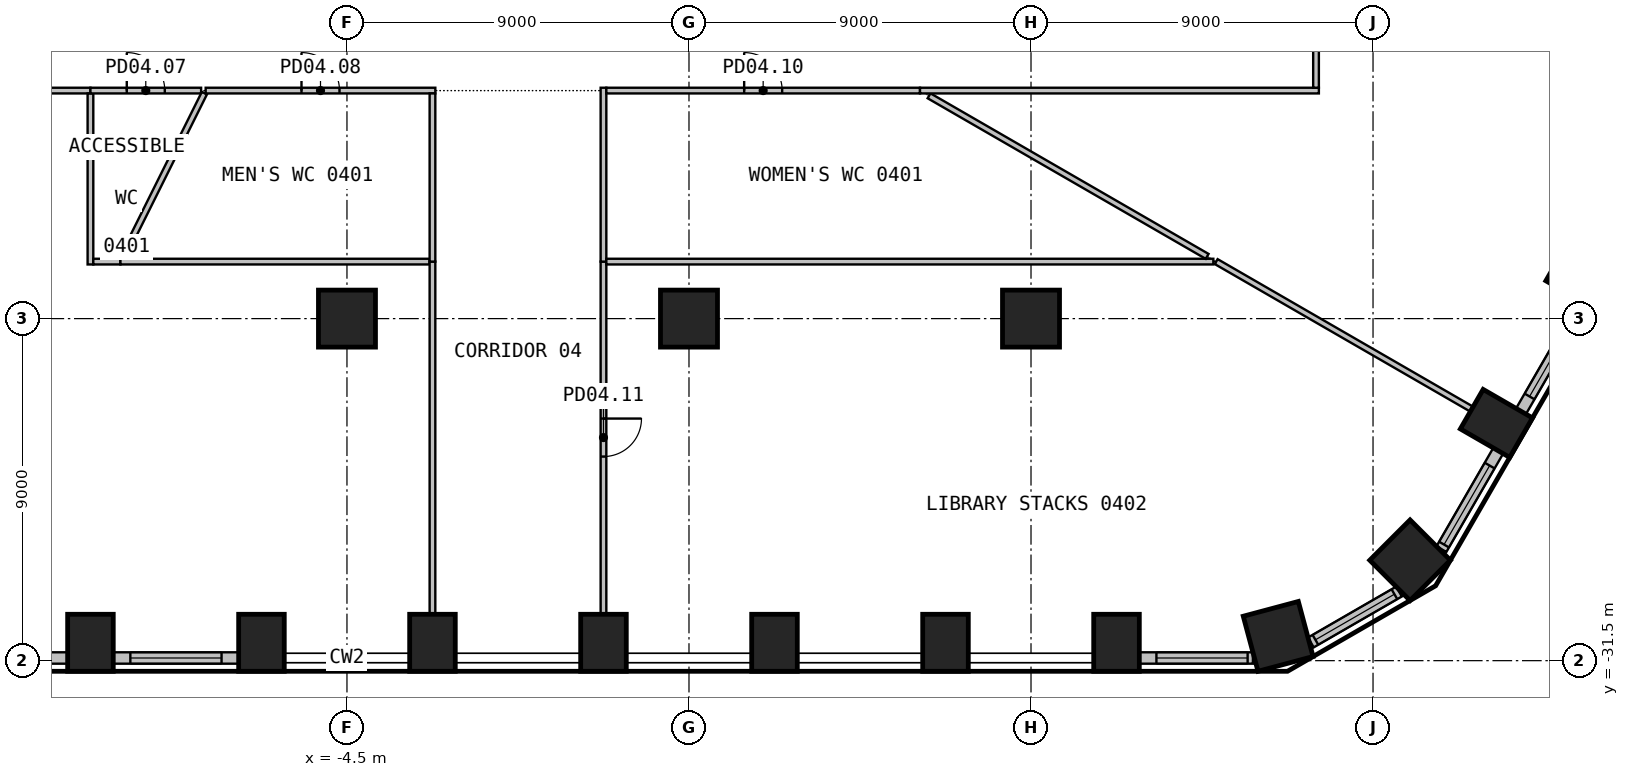
"""IFC4 building model, lengths in metres.
Left out: names, types, materials, properties, quantities, classifications, styles, units other than length and angle.
Written with IfcOpenShell. Run it as: python <this file> out.ifc"""

import sys

from ifc_helpers import new_model, si_unit, direction, frame, frame_2d, origin, origin_2d, place, context, subcontext, project, spatial, rectangle, circle, extrude, element, fill, save


model = new_model("IFC4")
c1 = context("Model", 3, precision=1e-05, world=origin(), true_north=direction((0.0, 1.0)))
c2 = subcontext(c1, "Body", "Model", "MODEL_VIEW")
j1 = project(units=[si_unit("LENGTHUNIT", "METRE"), si_unit("PLANEANGLEUNIT", "RADIAN")], contexts=[c1])
p1 = place(None, origin())
s1 = spatial("IfcSite", under=j1, at=p1, CompositionType="ELEMENT")
p2 = place(p1, origin())
s2 = spatial("IfcBuilding", under=s1, at=p2, CompositionType="ELEMENT")
p3 = place(p2, frame((0.0, 0.0, 20.4)))
s3 = spatial("IfcBuildingStorey", under=s2, at=p3, CompositionType="ELEMENT", Elevation=20.4)
for number, where, z_axis, x_axis in (
    (1, (-11.25, -31.03, 0.0), (0.0, 0.0, 1.0), (1.0, 0.0, 0.0)),
    (2, (-6.75, -31.03, 0.0), (0.0, 0.0, 1.0), (1.0, 0.0, 0.0)),
    (3, (-2.25, -31.03, 0.0), (0.0, 0.0, 1.0), (1.0, 0.0, 0.0)),
    (4, (2.25, -31.03, 0.0), (0.0, 0.0, 1.0), (1.0, 0.0, 0.0)),
    (5, (6.75, -31.03, 0.0), (0.0, 0.0, 1.0), (1.0, 0.0, 0.0)),
    (6, (11.25, -31.03, 0.0), (0.0, 0.0, 1.0), (1.0, 0.0, 0.0)),
    (7, (15.75, -31.03, 0.0), (0.0, 0.0, 1.0), (1.0, 0.0, 0.0)),
):
    element("IfcColumn", number, at=place(p3, frame(where, z_axis=z_axis, x_axis=x_axis)), inside=s3, PredefinedType="COLUMN", context=c2, shape_type="SweptSolid", body=[
        extrude(rectangle(XDim=1.2, YDim=1.5, at=origin_2d()), origin(), (0.0, 0.0, 1.0), 4.4),
    ])
for number, where, z_axis, x_axis in (
    (8, (20.004, -30.861, 0.0), (0.0, 0.0, 1.0), (0.966, 0.259, 0.0)),
    (9, (23.475, -28.857, 0.0), (0.0, 0.0, 1.0), (0.707, 0.707, 0.0)),
):
    element("IfcColumn", number, at=place(p3, frame(where, z_axis=z_axis, x_axis=x_axis)), inside=s3, PredefinedType="COLUMN", context=c2, shape_type="SweptSolid", body=[
        extrude(rectangle(XDim=1.5, YDim=1.5, at=origin_2d()), origin(), (0.0, 0.0, 1.0), 4.4),
    ])
for number, where, z_axis, x_axis in (
    (10, (25.748, -25.258, 0.0), (0.0, 0.0, 1.0), (0.5, 0.866, 0.0)),
    (11, (27.998, -21.361, 0.0), (0.0, 0.0, 1.0), (0.5, 0.866, 0.0)),
):
    element("IfcColumn", number, at=place(p3, frame(where, z_axis=z_axis, x_axis=x_axis)), inside=s3, PredefinedType="COLUMN", context=c2, shape_type="SweptSolid", body=[
        extrude(rectangle(XDim=1.2, YDim=1.5, at=origin_2d()), origin(), (0.0, 0.0, 1.0), 4.4),
    ])
for number, where, z_axis, x_axis in (
    (12, (-4.5, -22.5, 0.0), (0.0, 0.0, 1.0), (1.0, 0.0, 0.0)),
    (13, (4.5, -22.5, 0.0), (0.0, 0.0, 1.0), (1.0, 0.0, 0.0)),
    (14, (13.5, -22.5, 0.0), (0.0, 0.0, 1.0), (1.0, 0.0, 0.0)),
):
    element("IfcColumn", number, at=place(p3, frame(where, z_axis=z_axis, x_axis=x_axis)), inside=s3, PredefinedType="COLUMN", context=c2, shape_type="SweptSolid", body=[
        extrude(circle(Radius=0.75, at=origin_2d()), origin(), (0.0, 0.0, 1.0), 4.4),
    ])
p4 = place(p3, frame((-15.149, -31.43, 0.0), z_axis=(0.0, 0.0, 1.0), x_axis=(1.0, 0.0, 0.0)))
e15 = element("IfcWall", 15, at=p4, inside=s3, PredefinedType="SOLIDWALL", context=c2, shape_type="SweptSolid", body=[
    extrude(rectangle(XDim=3.299, YDim=0.3, at=frame_2d((1.649, 0.0))), origin(), (0.0, 0.0, 1.0), 4.4),
])
p5 = place(p4, frame((0.449, 0.0, 0.9)))
e16 = element("IfcOpeningElement", 16, at=p5, cuts=e15, PredefinedType="OPENING", context=c2, shape_type="SweptSolid", body=[
    extrude(rectangle(XDim=2.4, YDim=3.0, at=frame_2d((1.2, 1.5))), frame((0.0, 0.16, 0.0), z_axis=(0.0, -1.0, 0.0), x_axis=(1.0, 0.0, 0.0)), (0.0, 0.0, 1.0), 0.32),
])
p6 = place(p3, frame((-10.649, -31.43, 0.0), z_axis=(0.0, 0.0, 1.0), x_axis=(1.0, 0.0, 0.0)))
e17 = element("IfcWall", 17, at=p6, inside=s3, PredefinedType="SOLIDWALL", context=c2, shape_type="SweptSolid", body=[
    extrude(rectangle(XDim=3.299, YDim=0.3, at=frame_2d((1.649, 0.0))), origin(), (0.0, 0.0, 1.0), 4.4),
])
p7 = place(p6, frame((0.449, 0.0, 0.9)))
e18 = element("IfcOpeningElement", 18, at=p7, cuts=e17, PredefinedType="OPENING", context=c2, shape_type="SweptSolid", body=[
    extrude(rectangle(XDim=2.4, YDim=3.0, at=frame_2d((1.2, 1.5))), frame((0.0, 0.16, 0.0), z_axis=(0.0, -1.0, 0.0), x_axis=(1.0, 0.0, 0.0)), (0.0, 0.0, 1.0), 0.32),
])
p8 = place(p3, frame((16.351, -31.43, 0.0), z_axis=(0.0, 0.0, 1.0), x_axis=(1.0, 0.0, 0.0)))
e19 = element("IfcWall", 19, at=p8, inside=s3, PredefinedType="SOLIDWALL", context=c2, shape_type="SweptSolid", body=[
    extrude(rectangle(XDim=2.989, YDim=0.3, at=frame_2d((1.494, 0.0))), origin(), (0.0, 0.0, 1.0), 4.4),
])
p9 = place(p8, frame((0.449, 0.0, 0.9)))
e20 = element("IfcOpeningElement", 20, at=p9, cuts=e19, PredefinedType="OPENING", context=c2, shape_type="SweptSolid", body=[
    extrude(rectangle(XDim=2.4, YDim=3.0, at=frame_2d((1.2, 1.5))), frame((0.0, 0.16, 0.0), z_axis=(0.0, -1.0, 0.0), x_axis=(1.0, 0.0, 0.0)), (0.0, 0.0, 1.0), 0.32),
])
p10 = place(p3, frame((20.864, -31.021, 0.0), z_axis=(0.0, 0.0, 1.0), x_axis=(0.866001915448, 0.500040680786, 0.0)))
e21 = element("IfcWall", 21, at=p10, inside=s3, PredefinedType="SOLIDWALL", context=c2, shape_type="SweptSolid", body=[
    extrude(rectangle(XDim=2.678, YDim=0.3, at=frame_2d((1.339, 0.0))), origin(), (0.0, 0.0, 1.0), 4.4),
])
p11 = place(p10, frame((0.139, 0.0, 0.9)))
e22 = element("IfcOpeningElement", 22, at=p11, cuts=e21, PredefinedType="OPENING", context=c2, shape_type="SweptSolid", body=[
    extrude(rectangle(XDim=2.4, YDim=3.0, at=frame_2d((1.2, 1.5))), frame((0.0, 0.16, 0.0), z_axis=(0.0, -1.0, 0.0), x_axis=(1.0, 0.0, 0.0)), (0.0, 0.0, 1.0), 0.32),
])
p12 = place(p3, frame((24.299, -28.566, 0.0), z_axis=(0.0, 0.0, 1.0), x_axis=(0.49999586137, 0.866027793211, 0.0)))
e23 = element("IfcWall", 23, at=p12, inside=s3, PredefinedType="SOLIDWALL", context=c2, shape_type="SweptSolid", body=[
    extrude(rectangle(XDim=2.989, YDim=0.3, at=frame_2d((1.494, 0.0))), origin(), (0.0, 0.0, 1.0), 4.4),
])
p13 = place(p12, frame((0.139, 0.0, 0.9)))
e24 = element("IfcOpeningElement", 24, at=p13, cuts=e23, PredefinedType="OPENING", context=c2, shape_type="SweptSolid", body=[
    extrude(rectangle(XDim=2.4, YDim=3.0, at=frame_2d((1.2, 1.5))), frame((0.0, 0.16, 0.0), z_axis=(0.0, -1.0, 0.0), x_axis=(1.0, 0.0, 0.0)), (0.0, 0.0, 1.0), 0.32),
])
p14 = place(p3, frame((26.394, -24.938, 0.0), z_axis=(0.0, 0.0, 1.0), x_axis=(0.499991515992, 0.866030301974, 0.0)))
e25 = element("IfcWall", 25, at=p14, inside=s3, PredefinedType="SOLIDWALL", context=c2, shape_type="SweptSolid", body=[
    extrude(rectangle(XDim=3.299, YDim=0.3, at=frame_2d((1.649, 0.0))), origin(), (0.0, 0.0, 1.0), 4.4),
])
p15 = place(p14, frame((0.449, 0.0, 0.9)))
e26 = element("IfcOpeningElement", 26, at=p15, cuts=e25, PredefinedType="OPENING", context=c2, shape_type="SweptSolid", body=[
    extrude(rectangle(XDim=2.4, YDim=3.0, at=frame_2d((1.2, 1.5))), frame((0.0, 0.16, 0.0), z_axis=(0.0, -1.0, 0.0), x_axis=(1.0, 0.0, 0.0)), (0.0, 0.0, 1.0), 0.32),
])
p16 = place(p3, frame((-20.925, -16.5, 0.0), z_axis=(0.0, 0.0, 1.0), x_axis=(1.0, 0.0, 0.0)))
e27 = element("IfcWall", 27, at=p16, inside=s3, PredefinedType="PARTITIONING", context=c2, shape_type="SweptSolid", body=[
    extrude(rectangle(XDim=9.675, YDim=0.15, at=frame_2d((4.837, 0.0))), origin(), (0.0, 0.0, 1.0), 4.4),
])
p17 = place(p3, frame((-11.25, -16.575, 0.0), z_axis=(0.0, 0.0, 1.0), x_axis=(0.0, -1.0, 0.0)))
e28 = element("IfcWall", 28, at=p17, inside=s3, PredefinedType="PARTITIONING", context=c2, shape_type="SweptSolid", body=[
    extrude(rectangle(XDim=4.5, YDim=0.15, at=frame_2d((2.25, 0.0))), origin(), (0.0, 0.0, 1.0), 4.4),
])
p18 = place(p3, frame((-11.175, -21.0, 0.0), z_axis=(0.0, 0.0, 1.0), x_axis=(1.0, 0.0, 0.0)))
e29 = element("IfcWall", 29, at=p18, inside=s3, PredefinedType="PARTITIONING", context=c2, shape_type="SweptSolid", body=[
    extrude(rectangle(XDim=0.714, YDim=0.15, at=frame_2d((0.357, 0.0))), origin(), (0.0, 0.0, 1.0), 4.4),
])
p19 = place(p3, frame((-11.25, -16.5, 0.0), z_axis=(0.0, 0.0, 1.0), x_axis=(1.0, 0.0, 0.0)))
e30 = element("IfcWall", 30, at=p19, inside=s3, PredefinedType="PARTITIONING", context=c2, shape_type="SweptSolid", body=[
    extrude(rectangle(XDim=2.912, YDim=0.15, at=frame_2d((1.456, 0.0))), origin(), (0.0, 0.0, 1.0), 4.4),
])
p20 = place(p19, frame((0.956, 0.0, 0.0)))
e31 = element("IfcOpeningElement", 31, at=p20, cuts=e30, PredefinedType="OPENING", context=c2, shape_type="SweptSolid", body=[
    extrude(rectangle(XDim=1.0, YDim=2.1, at=frame_2d((0.5, 1.05))), frame((0.0, 0.085, 0.0), z_axis=(0.0, -1.0, 0.0), x_axis=(1.0, 0.0, 0.0)), (0.0, 0.0, 1.0), 0.17),
])
p21 = place(p3, frame((-8.251, -16.567, 0.0), z_axis=(0.0, 0.0, 1.0), x_axis=(-0.446101910457, -0.894982170486, 0.0)))
e32 = element("IfcWall", 32, at=p21, inside=s3, PredefinedType="PARTITIONING", context=c2, shape_type="SweptSolid", body=[
    extrude(rectangle(XDim=4.833, YDim=0.15, at=frame_2d((2.417, 0.0))), origin(), (0.0, 0.0, 1.0), 4.4),
])
p22 = place(p3, frame((-10.461, -21.0, 0.0), z_axis=(0.0, 0.0, 1.0), x_axis=(1.0, 0.0, 0.0)))
e33 = element("IfcWall", 33, at=p22, inside=s3, PredefinedType="PARTITIONING", context=c2, shape_type="SweptSolid", body=[
    extrude(rectangle(XDim=8.136, YDim=0.15, at=frame_2d((4.068, 0.0))), origin(), (0.0, 0.0, 1.0), 4.4),
])
p23 = place(p3, frame((-8.218, -16.5, 0.0), z_axis=(0.0, 0.0, 1.0), x_axis=(1.0, 0.0, 0.0)))
e34 = element("IfcWall", 34, at=p23, inside=s3, PredefinedType="PARTITIONING", context=c2, shape_type="SweptSolid", body=[
    extrude(rectangle(XDim=6.043, YDim=0.15, at=frame_2d((3.021, 0.0))), origin(), (0.0, 0.0, 1.0), 4.4),
])
p24 = place(p23, frame((2.521, 0.0, 0.0)))
e35 = element("IfcOpeningElement", 35, at=p24, cuts=e34, PredefinedType="OPENING", context=c2, shape_type="SweptSolid", body=[
    extrude(rectangle(XDim=1.0, YDim=2.1, at=frame_2d((0.5, 1.05))), frame((0.0, 0.085, 0.0), z_axis=(0.0, -1.0, 0.0), x_axis=(1.0, 0.0, 0.0)), (0.0, 0.0, 1.0), 0.17),
])
p25 = place(p3, frame((-2.25, -30.26, 0.0), z_axis=(0.0, 0.0, 1.0), x_axis=(0.0, 1.0, 0.0)))
e36 = element("IfcWall", 36, at=p25, inside=s3, PredefinedType="PARTITIONING", context=c2, shape_type="SweptSolid", body=[
    extrude(rectangle(XDim=9.26, YDim=0.15, at=frame_2d((4.63, 0.0))), origin(), (0.0, 0.0, 1.0), 4.4),
])
p26 = place(p3, frame((-2.25, -21.0, 0.0), z_axis=(0.0, 0.0, 1.0), x_axis=(0.0, 1.0, 0.0)))
e37 = element("IfcWall", 37, at=p26, inside=s3, PredefinedType="PARTITIONING", context=c2, shape_type="SweptSolid", body=[
    extrude(rectangle(XDim=4.425, YDim=0.15, at=frame_2d((2.212, 0.0))), origin(), (0.0, 0.0, 1.0), 4.4),
])
p27 = place(p3, frame((2.25, -21.0, 0.0), z_axis=(0.0, 0.0, 1.0), x_axis=(0.0, -1.0, 0.0)))
e38 = element("IfcWall", 38, at=p27, inside=s3, PredefinedType="PARTITIONING", context=c2, shape_type="SweptSolid", body=[
    extrude(rectangle(XDim=9.26, YDim=0.15, at=frame_2d((4.63, 0.0))), origin(), (0.0, 0.0, 1.0), 4.4),
])
p28 = place(p27, frame((4.13, 0.0, 0.0)))
e39 = element("IfcOpeningElement", 39, at=p28, cuts=e38, PredefinedType="OPENING", context=c2, shape_type="SweptSolid", body=[
    extrude(rectangle(XDim=1.0, YDim=2.1, at=frame_2d((0.5, 1.05))), frame((0.0, 0.085, 0.0), z_axis=(0.0, -1.0, 0.0), x_axis=(1.0, 0.0, 0.0)), (0.0, 0.0, 1.0), 0.17),
])
p29 = place(p3, frame((2.25, -16.425, 0.0), z_axis=(0.0, 0.0, 1.0), x_axis=(0.0, -1.0, 0.0)))
e40 = element("IfcWall", 40, at=p29, inside=s3, PredefinedType="PARTITIONING", context=c2, shape_type="SweptSolid", body=[
    extrude(rectangle(XDim=4.575, YDim=0.15, at=frame_2d((2.288, 0.0))), origin(), (0.0, 0.0, 1.0), 4.4),
])
p30 = place(p3, frame((18.298, -21.0, 0.0), z_axis=(0.0, 0.0, 1.0), x_axis=(-1.0, 0.0, 0.0)))
e41 = element("IfcWall", 41, at=p30, inside=s3, PredefinedType="PARTITIONING", context=c2, shape_type="SweptSolid", body=[
    extrude(rectangle(XDim=15.973, YDim=0.15, at=frame_2d((7.987, 0.0))), origin(), (0.0, 0.0, 1.0), 4.4),
])
p31 = place(p3, frame((2.325, -16.5, 0.0), z_axis=(0.0, 0.0, 1.0), x_axis=(1.0, 0.0, 0.0)))
e42 = element("IfcWall", 42, at=p31, inside=s3, PredefinedType="PARTITIONING", context=c2, shape_type="SweptSolid", body=[
    extrude(rectangle(XDim=8.254, YDim=0.15, at=frame_2d((4.127, 0.0))), origin(), (0.0, 0.0, 1.0), 4.4),
])
p32 = place(p31, frame((3.627, 0.0, 0.0)))
e43 = element("IfcOpeningElement", 43, at=p32, cuts=e42, PredefinedType="OPENING", context=c2, shape_type="SweptSolid", body=[
    extrude(rectangle(XDim=1.0, YDim=2.1, at=frame_2d((0.5, 1.05))), frame((0.0, 0.085, 0.0), z_axis=(0.0, -1.0, 0.0), x_axis=(1.0, 0.0, 0.0)), (0.0, 0.0, 1.0), 0.17),
])
p33 = place(p3, frame((10.817, -16.637, 0.0), z_axis=(0.0, 0.0, 1.0), x_axis=(0.866011886744, -0.50002341147, 0.0)))
e44 = element("IfcWall", 44, at=p33, inside=s3, PredefinedType="PARTITIONING", context=c2, shape_type="SweptSolid", body=[
    extrude(rectangle(XDim=8.45, YDim=0.15, at=frame_2d((4.225, 0.0))), origin(), (0.0, 0.0, 1.0), 4.4),
])
p34 = place(p3, frame((10.579, -16.5, 0.0), z_axis=(0.0, 0.0, 1.0), x_axis=(1.0, 0.0, 0.0)))
e45 = element("IfcWall", 45, at=p34, inside=s3, PredefinedType="PARTITIONING", context=c2, shape_type="SweptSolid", body=[
    extrude(rectangle(XDim=10.496, YDim=0.15, at=frame_2d((5.248, 0.0))), origin(), (0.0, 0.0, 1.0), 4.4),
])
p35 = place(p3, frame((18.373, -21.0, 0.0), z_axis=(0.0, 0.0, 1.0), x_axis=(0.865999760466, -0.500044412901, 0.0)))
e46 = element("IfcWall", 46, at=p35, inside=s3, PredefinedType="PARTITIONING", context=c2, shape_type="SweptSolid", body=[
    extrude(rectangle(XDim=7.745, YDim=0.15, at=frame_2d((3.873, 0.0))), origin(), (0.0, 0.0, 1.0), 4.4),
])
p36 = place(p3, frame((21.0, -16.425, 0.0), z_axis=(0.0, 0.0, 1.0), x_axis=(0.0, 1.0, 0.0)))
e47 = element("IfcWall", 47, at=p36, inside=s3, PredefinedType="PARTITIONING", context=c2, shape_type="SweptSolid", body=[
    extrude(rectangle(XDim=14.25, YDim=0.15, at=frame_2d((7.125, 0.0))), origin(), (0.0, 0.0, 1.0), 4.4),
])
p37 = place(p36, frame((6.625, 0.0, 0.0)))
e48 = element("IfcOpeningElement", 48, at=p37, cuts=e47, PredefinedType="OPENING", context=c2, shape_type="SweptSolid", body=[
    extrude(rectangle(XDim=1.0, YDim=2.1, at=frame_2d((0.5, 1.05))), frame((0.0, 0.085, 0.0), z_axis=(0.0, -1.0, 0.0), x_axis=(1.0, 0.0, 0.0)), (0.0, 0.0, 1.0), 0.17),
])
p38 = place(p7, origin())
e49 = element("IfcWindow", 49, at=p38, inside=s3, PartitioningType="SINGLE_PANEL", PredefinedType="WINDOW", context=c2, shape_type="SweptSolid", body=[
    extrude(rectangle(XDim=2.4, YDim=3.0, at=frame_2d((1.2, 1.5))), frame((0.0, 0.03, 0.0), z_axis=(0.0, -1.0, 0.0), x_axis=(1.0, 0.0, 0.0)), (0.0, 0.0, 1.0), 0.06),
])
fill(e18, e49)
p39 = place(p9, origin())
e50 = element("IfcWindow", 50, at=p39, inside=s3, PartitioningType="SINGLE_PANEL", PredefinedType="WINDOW", context=c2, shape_type="SweptSolid", body=[
    extrude(rectangle(XDim=2.4, YDim=3.0, at=frame_2d((1.2, 1.5))), frame((0.0, 0.03, 0.0), z_axis=(0.0, -1.0, 0.0), x_axis=(1.0, 0.0, 0.0)), (0.0, 0.0, 1.0), 0.06),
])
fill(e20, e50)
p40 = place(p11, origin())
e51 = element("IfcWindow", 51, at=p40, inside=s3, PartitioningType="SINGLE_PANEL", PredefinedType="WINDOW", context=c2, shape_type="SweptSolid", body=[
    extrude(rectangle(XDim=2.4, YDim=3.0, at=frame_2d((1.2, 1.5))), frame((0.0, 0.03, 0.0), z_axis=(0.0, -1.0, 0.0), x_axis=(1.0, 0.0, 0.0)), (0.0, 0.0, 1.0), 0.06),
])
fill(e22, e51)
p41 = place(p13, origin())
e52 = element("IfcWindow", 52, at=p41, inside=s3, PartitioningType="SINGLE_PANEL", PredefinedType="WINDOW", context=c2, shape_type="SweptSolid", body=[
    extrude(rectangle(XDim=2.4, YDim=3.0, at=frame_2d((1.2, 1.5))), frame((0.0, 0.03, 0.0), z_axis=(0.0, -1.0, 0.0), x_axis=(1.0, 0.0, 0.0)), (0.0, 0.0, 1.0), 0.06),
])
fill(e24, e52)
p42 = place(p15, origin())
e53 = element("IfcWindow", 53, at=p42, inside=s3, PartitioningType="SINGLE_PANEL", PredefinedType="WINDOW", context=c2, shape_type="SweptSolid", body=[
    extrude(rectangle(XDim=2.4, YDim=3.0, at=frame_2d((1.2, 1.5))), frame((0.0, 0.03, 0.0), z_axis=(0.0, -1.0, 0.0), x_axis=(1.0, 0.0, 0.0)), (0.0, 0.0, 1.0), 0.06),
])
fill(e26, e53)
p43 = place(p20, origin())
e54 = element("IfcDoor", 54, at=p43, inside=s3, OperationType="SINGLE_SWING_RIGHT", PredefinedType="DOOR", context=c2, shape_type="SweptSolid", body=[
    extrude(rectangle(XDim=1.0, YDim=2.1, at=frame_2d((0.5, 1.05))), frame((0.0, 0.025, 0.0), z_axis=(0.0, -1.0, 0.0), x_axis=(1.0, 0.0, 0.0)), (0.0, 0.0, 1.0), 0.05),
])
fill(e31, e54)
p44 = place(p24, origin())
e55 = element("IfcDoor", 55, at=p44, inside=s3, OperationType="SINGLE_SWING_RIGHT", PredefinedType="DOOR", context=c2, shape_type="SweptSolid", body=[
    extrude(rectangle(XDim=1.0, YDim=2.1, at=frame_2d((0.5, 1.05))), frame((0.0, 0.025, 0.0), z_axis=(0.0, -1.0, 0.0), x_axis=(1.0, 0.0, 0.0)), (0.0, 0.0, 1.0), 0.05),
])
fill(e35, e55)
p45 = place(p32, origin())
e56 = element("IfcDoor", 56, at=p45, inside=s3, OperationType="SINGLE_SWING_RIGHT", PredefinedType="DOOR", context=c2, shape_type="SweptSolid", body=[
    extrude(rectangle(XDim=1.0, YDim=2.1, at=frame_2d((0.5, 1.05))), frame((0.0, 0.025, 0.0), z_axis=(0.0, -1.0, 0.0), x_axis=(1.0, 0.0, 0.0)), (0.0, 0.0, 1.0), 0.05),
])
fill(e43, e56)
p46 = place(p28, origin())
e57 = element("IfcDoor", 57, at=p46, inside=s3, OperationType="SINGLE_SWING_LEFT", PredefinedType="DOOR", context=c2, shape_type="SweptSolid", body=[
    extrude(rectangle(XDim=1.0, YDim=2.1, at=frame_2d((0.5, 1.05))), frame((0.0, 0.025, 0.0), z_axis=(0.0, -1.0, 0.0), x_axis=(1.0, 0.0, 0.0)), (0.0, 0.0, 1.0), 0.05),
])
fill(e39, e57)
save(model, sys.argv[1])
